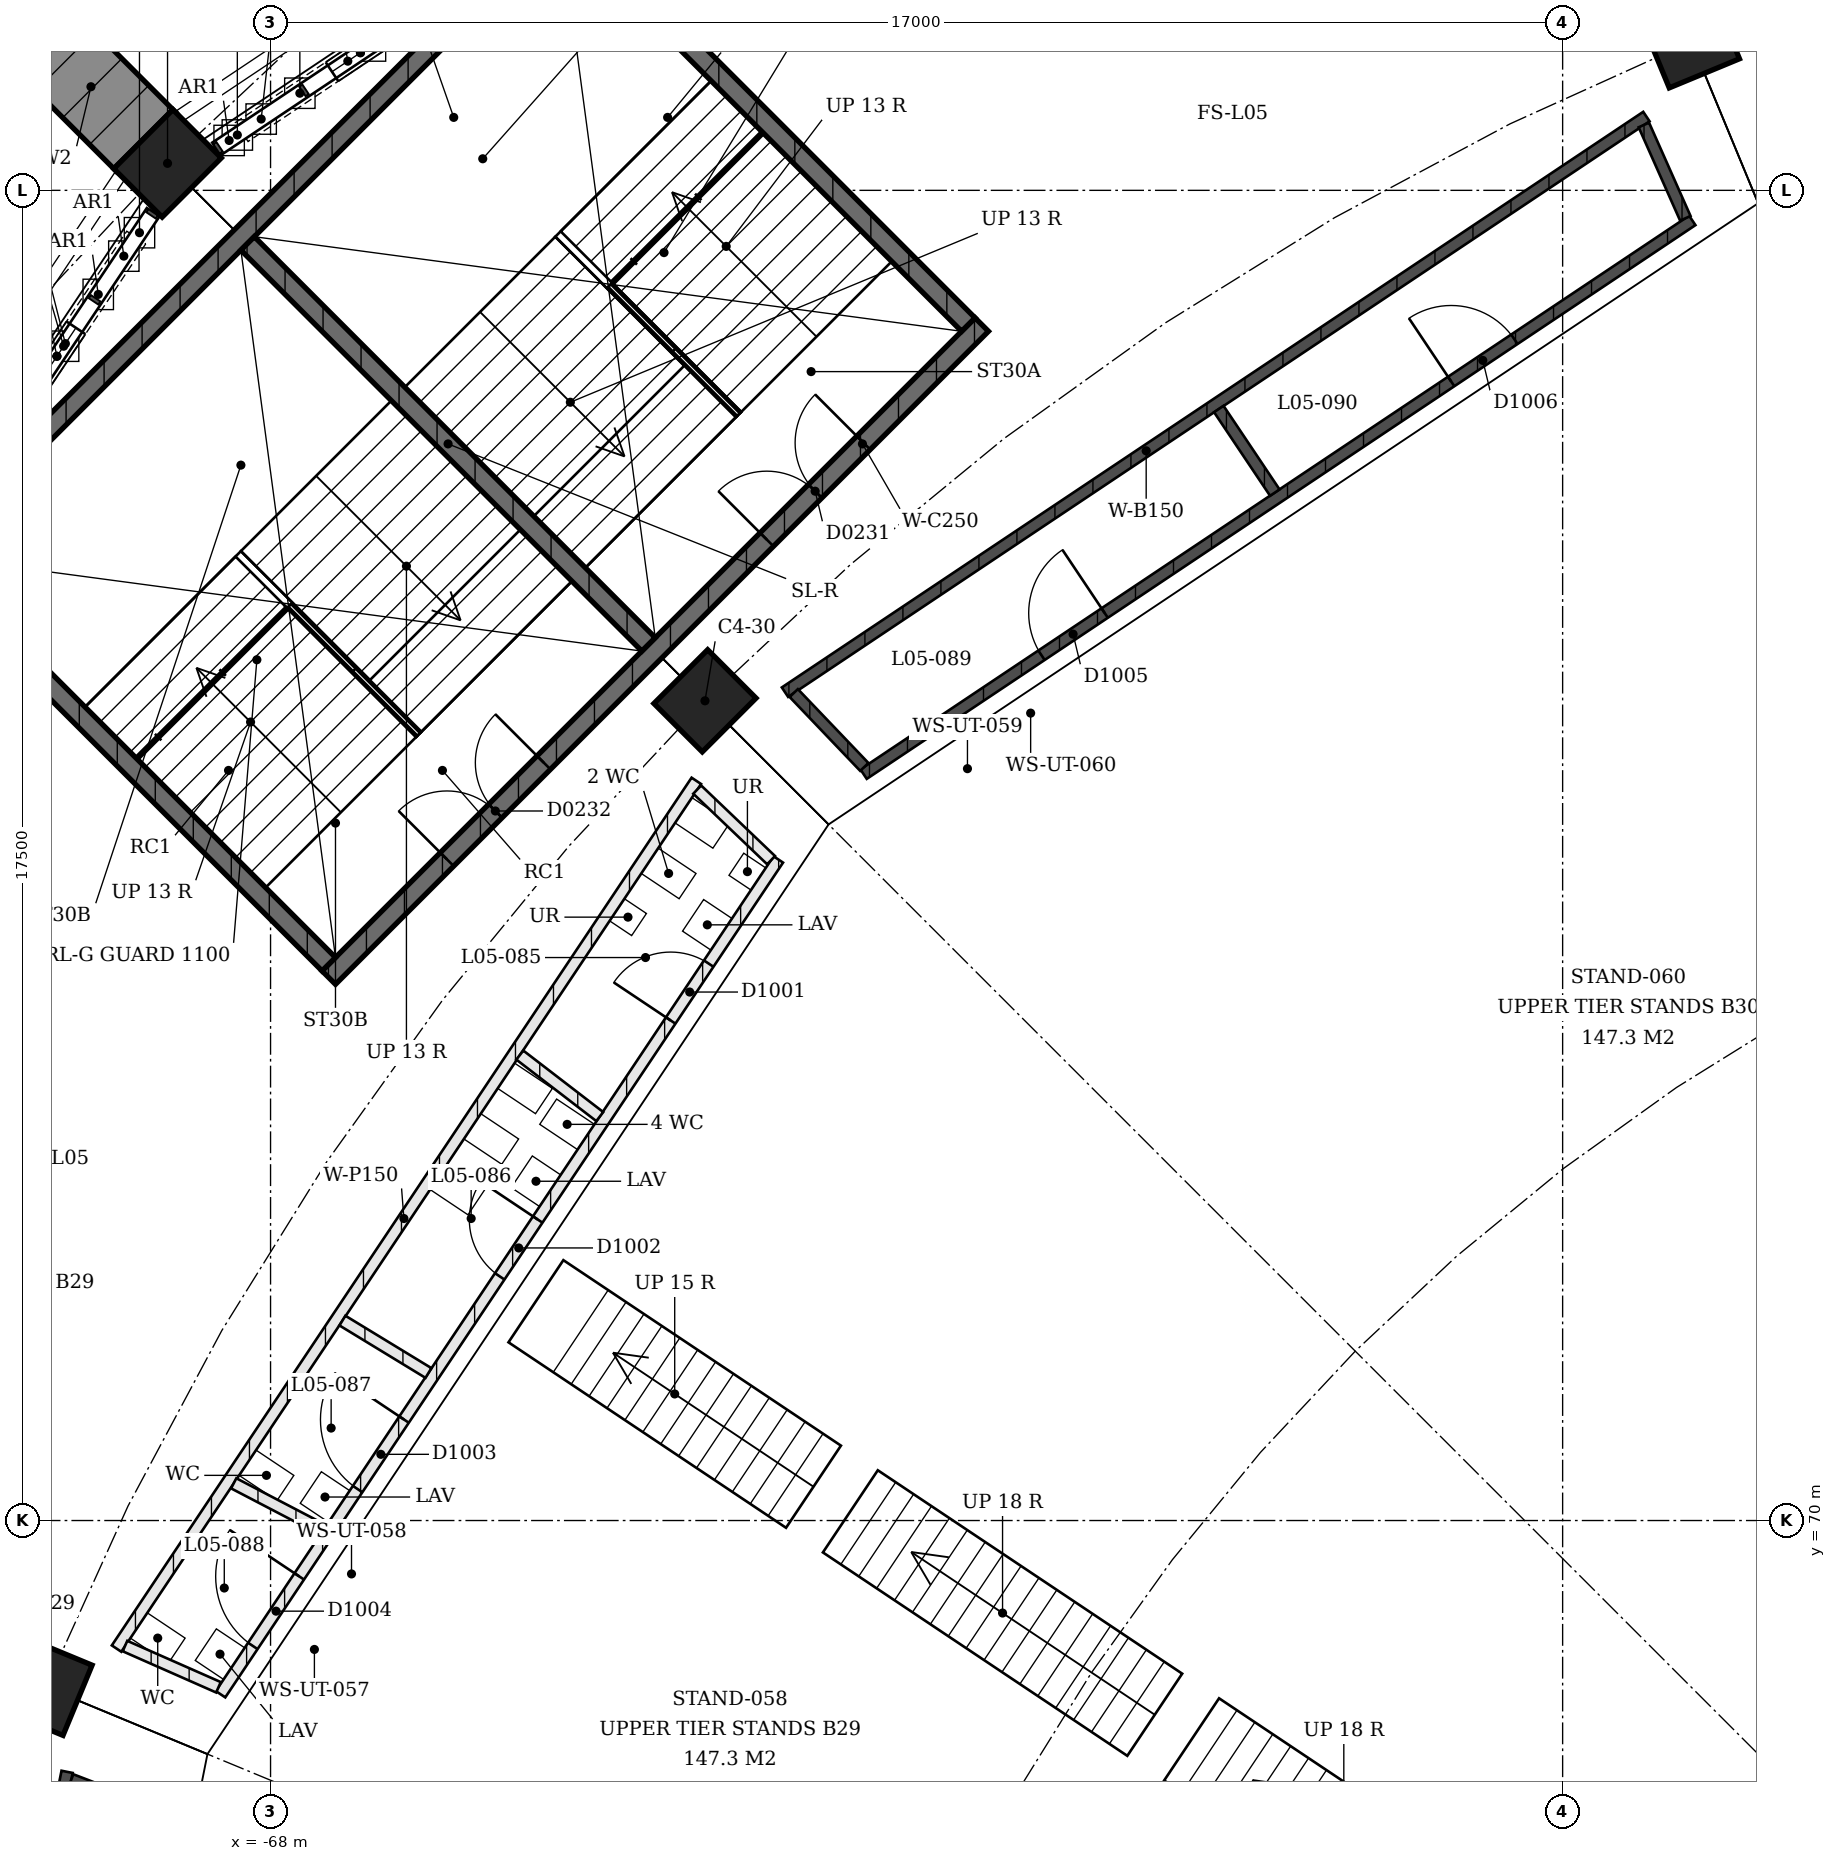
"""IFC4 building model, lengths in metres.
Left out: names, types, materials, properties, quantities, classifications, styles, units other than length and angle.
Written with IfcOpenShell. Run it as: python <this file> out.ifc"""

import sys

from ifc_helpers import new_model, si_unit, direction, frame, frame_2d, origin, origin_2d, place, context, subcontext, project, spatial, polyline, rectangle, outline, extrude, element, fill, save


model = new_model("IFC4")
c1 = context("Model", 3, precision=1e-05, world=origin(), true_north=direction((0.0, 1.0)))
c2 = subcontext(c1, "Body", "Model", "MODEL_VIEW")
j1 = project(units=[si_unit("LENGTHUNIT", "METRE"), si_unit("PLANEANGLEUNIT", "RADIAN")], contexts=[c1])
p1 = place(None, origin())
s1 = spatial("IfcSite", under=j1, at=p1, CompositionType="ELEMENT")
p2 = place(p1, origin())
s2 = spatial("IfcBuilding", under=s1, at=p2, CompositionType="ELEMENT")
p3 = place(p2, frame((0.0, 0.0, 22.5)))
s3 = spatial("IfcBuildingStorey", under=s2, at=p3, CompositionType="ELEMENT", Elevation=22.5)
for number, where, z_axis, x_axis in (
    (1, (-70.955, 67.807, 0.0), (0.0, 0.0, 1.0), (-0.383, -0.924, 0.0)),
    (2, (-62.284, 80.784, 0.0), (0.0, 0.0, 1.0), (-0.707, -0.707, 0.0)),
):
    element("IfcColumn", number, at=place(p3, frame(where, z_axis=z_axis, x_axis=x_axis)), inside=s3, PredefinedType="COLUMN", context=c2, shape_type="SweptSolid", body=[
        extrude(rectangle(XDim=1.0, YDim=0.9, at=origin_2d()), origin(), (0.0, 0.0, 1.0), 6.5),
    ])
p4 = place(p3, frame((-69.355, 87.855, 0.0), z_axis=(0.0, 0.0, 1.0), x_axis=(-0.707106781187, -0.707106781187, 0.0)))
e3 = element("IfcColumn", 3, at=p4, inside=s3, PredefinedType="COLUMN", context=c2, shape_type="SweptSolid", body=[
    extrude(rectangle(XDim=1.1, YDim=0.9, at=origin_2d()), origin(), (0.0, 0.0, 1.0), 6.5),
])
p5 = place(p3, frame((-49.307, 89.455, 0.0), z_axis=(0.0, 0.0, 1.0), x_axis=(-0.923879532511, -0.382683432365, 0.0)))
e4 = element("IfcColumn", 4, at=p5, inside=s3, PredefinedType="COLUMN", context=c2, shape_type="SweptSolid", body=[
    extrude(rectangle(XDim=1.0, YDim=0.9, at=origin_2d()), origin(), (0.0, 0.0, 1.0), 6.5),
])
p6 = place(p3, frame((-71.854, 83.755, 4.1), z_axis=(0.0, 0.0, 1.0), x_axis=(0.555554703021, 0.831479988906, 0.0)))
e5 = element("IfcWall", 5, at=p6, inside=s3, PredefinedType="SOLIDWALL", context=c2, shape_type="SweptSolid", body=[
    extrude(outline(polyline([(0.0, 0.0), (3.757, 0.0), (3.757, 0.05), (3.635, 1.311), (3.271, 2.577), (2.678, 3.754), (1.879, 4.8), (1.079, 3.754), (0.486, 2.577), (0.123, 1.311), (0.0, 0.05), (0.0, 0.0)])), frame((0.0, 0.15, 0.0), z_axis=(0.0, -1.0, 0.0), x_axis=(1.0, 0.0, 0.0)), (0.0, 0.0, 1.0), 0.3),
])
p7 = place(p6, frame((1.428, 0.0, 0.4)))
e6 = element("IfcOpeningElement", 6, at=p7, cuts=e5, PredefinedType="OPENING", context=c2, shape_type="SweptSolid", body=[
    extrude(rectangle(XDim=0.9, YDim=3.6, at=frame_2d((0.45, 1.8))), frame((0.0, 0.16, 0.0), z_axis=(0.0, -1.0, 0.0), x_axis=(1.0, 0.0, 0.0)), (0.0, 0.0, 1.0), 0.32),
])
p8 = place(p3, frame((-68.379, 88.267, 4.1), z_axis=(0.0, 0.0, 1.0), x_axis=(0.831479988906, 0.555554703021, 0.0)))
e7 = element("IfcWall", 7, at=p8, inside=s3, PredefinedType="SOLIDWALL", context=c2, shape_type="SweptSolid", body=[
    extrude(outline(polyline([(0.0, 0.0), (3.757, 0.0), (3.757, 0.05), (3.635, 1.311), (3.271, 2.577), (2.678, 3.754), (1.879, 4.8), (1.079, 3.754), (0.486, 2.577), (0.123, 1.311), (0.0, 0.05), (0.0, 0.0)])), frame((0.0, 0.15, 0.0), z_axis=(0.0, -1.0, 0.0), x_axis=(1.0, 0.0, 0.0)), (0.0, 0.0, 1.0), 0.3),
])
p9 = place(p8, frame((1.428, 0.0, 0.4)))
e8 = element("IfcOpeningElement", 8, at=p9, cuts=e7, PredefinedType="OPENING", context=c2, shape_type="SweptSolid", body=[
    extrude(rectangle(XDim=0.9, YDim=3.6, at=frame_2d((0.45, 1.8))), frame((0.0, 0.16, 0.0), z_axis=(0.0, -1.0, 0.0), x_axis=(1.0, 0.0, 0.0)), (0.0, 0.0, 1.0), 0.32),
])
p10 = place(p3, frame((-58.643, 85.734, 0.0), z_axis=(0.0, 0.0, 1.0), x_axis=(-0.707106781187, -0.707106781187, 0.0)))
e9 = element("IfcWall", 9, at=p10, inside=s3, PredefinedType="SHEAR", context=c2, shape_type="SweptSolid", body=[
    extrude(rectangle(XDim=12.15, YDim=0.25, at=frame_2d((6.075, 0.0))), origin(), (0.0, 0.0, 1.0), 2.1),
])
p11 = place(p10, frame((2.2, 0.0, 0.0)))
e10 = element("IfcOpeningElement", 10, at=p11, cuts=e9, PredefinedType="OPENING", context=c2, shape_type="SweptSolid", body=[
    extrude(rectangle(XDim=1.8, YDim=2.1, at=frame_2d((0.9, 1.05))), frame((0.0, 0.125, 0.0), z_axis=(0.0, -1.0, 0.0), x_axis=(1.0, 0.0, 0.0)), (0.0, 0.0, 1.0), 0.25),
])
p12 = place(p10, frame((8.15, 0.0, 0.0)))
e11 = element("IfcOpeningElement", 11, at=p12, cuts=e9, PredefinedType="OPENING", context=c2, shape_type="SweptSolid", body=[
    extrude(rectangle(XDim=1.8, YDim=2.1, at=frame_2d((0.9, 1.05))), frame((0.0, 0.125, 0.0), z_axis=(0.0, -1.0, 0.0), x_axis=(1.0, 0.0, 0.0)), (0.0, 0.0, 1.0), 0.25),
])
p13 = place(p3, frame((-64.094, 91.186, 0.0), z_axis=(0.0, 0.0, 1.0), x_axis=(-0.707106781187, -0.707106781187, 0.0)))
e12 = element("IfcWall", 12, at=p13, inside=s3, PredefinedType="SHEAR", context=c2, shape_type="SweptSolid", body=[
    extrude(rectangle(XDim=12.15, YDim=0.25, at=frame_2d((6.075, 0.0))), origin(), (0.0, 0.0, 1.0), 2.1),
])
for number, where, z_axis, x_axis in (
    (13, (-58.819, 85.734, 0.0), (0.0, 0.0, 1.0), (-0.707, 0.707, 0.0)),
    (14, (-67.234, 77.319, 0.0), (0.0, 0.0, 1.0), (-0.707, 0.707, 0.0)),
):
    element("IfcWall", number, at=place(p3, frame(where, z_axis=z_axis, x_axis=x_axis)), inside=s3, PredefinedType="SHEAR", context=c2, shape_type="SweptSolid", body=[
        extrude(rectangle(XDim=7.46, YDim=0.25, at=frame_2d((3.73, 0.0))), origin(), (0.0, 0.0, 1.0), 2.1),
    ])
p14 = place(p3, frame((-63.027, 81.527, 0.0), z_axis=(0.0, 0.0, 1.0), x_axis=(-0.707106781187, 0.707106781187, 0.0)))
e15 = element("IfcWall", 15, at=p14, inside=s3, PredefinedType="SHEAR", context=c2, shape_type="SweptSolid", body=[
    extrude(rectangle(XDim=7.46, YDim=0.25, at=frame_2d((3.73, 0.0))), origin(), (0.0, 0.0, 1.0), 2.1),
])
p15 = place(p3, frame((-73.336, 53.325, 0.0), z_axis=(0.0, 0.0, 1.0), x_axis=(0.195086146928, 0.980786110871, 0.0)))
e16 = element("IfcWall", 16, at=p15, inside=s3, PredefinedType="SOLIDWALL", context=c2, shape_type="SweptSolid", body=[
    extrude(rectangle(XDim=13.631, YDim=0.15, at=frame_2d((6.815, 0.0))), origin(), (0.0, 0.0, 1.0), 3.0),
])
p16 = place(p3, frame((-69.368, 66.109, 0.0), z_axis=(0.0, 0.0, 1.0), x_axis=(-0.933331557443, 0.359015603953, 0.0)))
e17 = element("IfcWall", 17, at=p16, inside=s3, PredefinedType="SOLIDWALL", context=c2, shape_type="SweptSolid", body=[
    extrude(rectangle(XDim=1.344, YDim=0.15, at=frame_2d((0.672, 0.0))), origin(), (0.0, 0.0, 1.0), 3.0),
])
p17 = place(p3, frame((-61.32, 78.697, 0.0), z_axis=(0.0, 0.0, 1.0), x_axis=(-0.555570028225, -0.831469749142, 0.0)))
e18 = element("IfcWall", 18, at=p17, inside=s3, PredefinedType="PARTITIONING", context=c2, shape_type="SweptSolid", body=[
    extrude(rectangle(XDim=13.209, YDim=0.15, at=frame_2d((6.604, 0.0))), origin(), (0.0, 0.0, 1.0), 3.0),
])
p18 = place(p17, frame((1.648, 0.0, 0.0)))
e19 = element("IfcOpeningElement", 19, at=p18, cuts=e18, PredefinedType="OPENING", context=c2, shape_type="SweptSolid", body=[
    extrude(rectangle(XDim=0.9, YDim=2.1, at=frame_2d((0.45, 1.05))), frame((0.0, 0.075, 0.0), z_axis=(0.0, -1.0, 0.0), x_axis=(1.0, 0.0, 0.0)), (0.0, 0.0, 1.0), 0.15),
])
p19 = place(p17, frame((5.697, 0.0, 0.0)))
e20 = element("IfcOpeningElement", 20, at=p19, cuts=e18, PredefinedType="OPENING", context=c2, shape_type="SweptSolid", body=[
    extrude(rectangle(XDim=0.9, YDim=2.1, at=frame_2d((0.45, 1.05))), frame((0.0, 0.075, 0.0), z_axis=(0.0, -1.0, 0.0), x_axis=(1.0, 0.0, 0.0)), (0.0, 0.0, 1.0), 0.15),
])
p20 = place(p17, frame((8.863, 0.0, 0.0)))
e21 = element("IfcOpeningElement", 21, at=p20, cuts=e18, PredefinedType="OPENING", context=c2, shape_type="SweptSolid", body=[
    extrude(rectangle(XDim=1.1, YDim=2.1, at=frame_2d((0.55, 1.05))), frame((0.0, 0.075, 0.0), z_axis=(0.0, -1.0, 0.0), x_axis=(1.0, 0.0, 0.0)), (0.0, 0.0, 1.0), 0.15),
])
p21 = place(p17, frame((11.344, 0.0, 0.0)))
e22 = element("IfcOpeningElement", 22, at=p21, cuts=e18, PredefinedType="OPENING", context=c2, shape_type="SweptSolid", body=[
    extrude(rectangle(XDim=1.1, YDim=2.1, at=frame_2d((0.55, 1.05))), frame((0.0, 0.075, 0.0), z_axis=(0.0, -1.0, 0.0), x_axis=(1.0, 0.0, 0.0)), (0.0, 0.0, 1.0), 0.15),
])
p22 = place(p3, frame((-62.398, 79.731, 0.0), z_axis=(0.0, 0.0, 1.0), x_axis=(-0.555573905052, -0.831467158717, 0.0)))
e23 = element("IfcWall", 23, at=p22, inside=s3, PredefinedType="PARTITIONING", context=c2, shape_type="SweptSolid", body=[
    extrude(rectangle(XDim=13.73, YDim=0.15, at=frame_2d((6.865, 0.0))), origin(), (0.0, 0.0, 1.0), 3.0),
])
p23 = place(p3, frame((-61.414, 78.688, 0.0), z_axis=(0.0, 0.0, 1.0), x_axis=(-0.723174104738, 0.690665776072, 0.0)))
e24 = element("IfcWall", 24, at=p23, inside=s3, PredefinedType="PARTITIONING", context=c2, shape_type="SweptSolid", body=[
    extrude(rectangle(XDim=1.344, YDim=0.15, at=frame_2d((0.672, 0.0))), origin(), (0.0, 0.0, 1.0), 3.0),
])
p24 = place(p3, frame((-63.668, 75.314, 0.0), z_axis=(0.0, 0.0, 1.0), x_axis=(-0.792767594219, 0.609524028695, 0.0)))
e25 = element("IfcWall", 25, at=p24, inside=s3, PredefinedType="PARTITIONING", context=c2, shape_type="SweptSolid", body=[
    extrude(rectangle(XDim=1.327, YDim=0.15, at=frame_2d((0.664, 0.0))), origin(), (0.0, 0.0, 1.0), 3.0),
])
p25 = place(p3, frame((-65.922, 71.941, 0.0), z_axis=(0.0, 0.0, 1.0), x_axis=(-0.854109602484, 0.520093056043, 0.0)))
e26 = element("IfcWall", 26, at=p25, inside=s3, PredefinedType="PARTITIONING", context=c2, shape_type="SweptSolid", body=[
    extrude(rectangle(XDim=1.325, YDim=0.15, at=frame_2d((0.663, 0.0))), origin(), (0.0, 0.0, 1.0), 3.0),
])
p26 = place(p3, frame((-67.304, 69.874, 0.0), z_axis=(0.0, 0.0, 1.0), x_axis=(-0.886633867097, 0.462472037768, 0.0)))
e27 = element("IfcWall", 27, at=p26, inside=s3, PredefinedType="PARTITIONING", context=c2, shape_type="SweptSolid", body=[
    extrude(rectangle(XDim=1.332, YDim=0.15, at=frame_2d((0.666, 0.0))), origin(), (0.0, 0.0, 1.0), 3.0),
])
p27 = place(p3, frame((-68.685, 67.806, 0.0), z_axis=(0.0, 0.0, 1.0), x_axis=(-0.914894130368, 0.403693857048, 0.0)))
e28 = element("IfcWall", 28, at=p27, inside=s3, PredefinedType="PARTITIONING", context=c2, shape_type="SweptSolid", body=[
    extrude(rectangle(XDim=1.344, YDim=0.15, at=frame_2d((0.672, 0.0))), origin(), (0.0, 0.0, 1.0), 3.0),
])
p28 = place(p3, frame((-60.197, 79.82, 0.0), z_axis=(0.0, 0.0, 1.0), x_axis=(0.831471244595, 0.555567790114, 0.0)))
e29 = element("IfcWall", 29, at=p28, inside=s3, PredefinedType="SOLIDWALL", context=c2, shape_type="SweptSolid", body=[
    extrude(rectangle(XDim=13.113, YDim=0.15, at=frame_2d((6.557, 0.0))), origin(), (0.0, 0.0, 1.0), 3.0),
])
p29 = place(p28, frame((2.815, 0.0, 0.0)))
e30 = element("IfcOpeningElement", 30, at=p29, cuts=e29, PredefinedType="OPENING", context=c2, shape_type="SweptSolid", body=[
    extrude(rectangle(XDim=1.0, YDim=2.1, at=frame_2d((0.5, 1.05))), frame((0.0, 0.075, 0.0), z_axis=(0.0, -1.0, 0.0), x_axis=(1.0, 0.0, 0.0)), (0.0, 0.0, 1.0), 0.15),
])
p30 = place(p28, frame((9.298, 0.0, 0.0)))
e31 = element("IfcOpeningElement", 31, at=p30, cuts=e29, PredefinedType="OPENING", context=c2, shape_type="SweptSolid", body=[
    extrude(rectangle(XDim=1.0, YDim=2.1, at=frame_2d((0.5, 1.05))), frame((0.0, 0.075, 0.0), z_axis=(0.0, -1.0, 0.0), x_axis=(1.0, 0.0, 0.0)), (0.0, 0.0, 1.0), 0.15),
])
p31 = place(p3, frame((-61.231, 80.898, 0.0), z_axis=(0.0, 0.0, 1.0), x_axis=(0.831471173823, 0.555567896033, 0.0)))
e32 = element("IfcWall", 32, at=p31, inside=s3, PredefinedType="SOLIDWALL", context=c2, shape_type="SweptSolid", body=[
    extrude(rectangle(XDim=13.631, YDim=0.15, at=frame_2d((6.815, 0.0))), origin(), (0.0, 0.0, 1.0), 3.0),
])
p32 = place(p3, frame((-60.188, 79.914, 0.0), z_axis=(0.0, 0.0, 1.0), x_axis=(-0.690665776072, 0.723174104738, 0.0)))
e33 = element("IfcWall", 33, at=p32, inside=s3, PredefinedType="SOLIDWALL", context=c2, shape_type="SweptSolid", body=[
    extrude(rectangle(XDim=1.344, YDim=0.15, at=frame_2d((0.672, 0.0))), origin(), (0.0, 0.0, 1.0), 3.0),
])
p33 = place(p3, frame((-54.787, 83.523, 0.0), z_axis=(0.0, 0.0, 1.0), x_axis=(-0.556613340271, 0.830771683095, 0.0)))
e34 = element("IfcWall", 34, at=p33, inside=s3, PredefinedType="SOLIDWALL", context=c2, shape_type="SweptSolid", body=[
    extrude(rectangle(XDim=1.324, YDim=0.15, at=frame_2d((0.662, 0.0))), origin(), (0.0, 0.0, 1.0), 3.0),
])
p34 = place(p3, frame((-49.386, 87.132, 0.0), z_axis=(0.0, 0.0, 1.0), x_axis=(-0.405902438759, 0.913916413142, 0.0)))
e35 = element("IfcWall", 35, at=p34, inside=s3, PredefinedType="SOLIDWALL", context=c2, shape_type="SweptSolid", body=[
    extrude(rectangle(XDim=1.344, YDim=0.15, at=frame_2d((0.672, 0.0))), origin(), (0.0, 0.0, 1.0), 3.0),
])
p35 = place(p7, origin())
e36 = element("IfcWindow", 36, at=p35, inside=s3, PartitioningType="SINGLE_PANEL", PredefinedType="WINDOW", context=c2, shape_type="SweptSolid", body=[
    extrude(rectangle(XDim=0.9, YDim=3.6, at=frame_2d((0.45, 1.8))), frame((0.0, 0.03, 0.0), z_axis=(0.0, -1.0, 0.0), x_axis=(1.0, 0.0, 0.0)), (0.0, 0.0, 1.0), 0.06),
])
fill(e6, e36)
p36 = place(p9, origin())
e37 = element("IfcWindow", 37, at=p36, inside=s3, PartitioningType="SINGLE_PANEL", PredefinedType="WINDOW", context=c2, shape_type="SweptSolid", body=[
    extrude(rectangle(XDim=0.9, YDim=3.6, at=frame_2d((0.45, 1.8))), frame((0.0, 0.03, 0.0), z_axis=(0.0, -1.0, 0.0), x_axis=(1.0, 0.0, 0.0)), (0.0, 0.0, 1.0), 0.06),
])
fill(e8, e37)
p37 = place(p11, origin())
e38 = element("IfcDoor", 38, at=p37, inside=s3, OperationType="DOUBLE_DOOR_SINGLE_SWING", PredefinedType="DOOR", context=c2, shape_type="SweptSolid", body=[
    extrude(rectangle(XDim=1.8, YDim=2.1, at=frame_2d((0.9, 1.05))), frame((0.0, 0.025, 0.0), z_axis=(0.0, -1.0, 0.0), x_axis=(1.0, 0.0, 0.0)), (0.0, 0.0, 1.0), 0.05),
])
fill(e10, e38)
p38 = place(p12, origin())
e39 = element("IfcDoor", 39, at=p38, inside=s3, OperationType="DOUBLE_DOOR_SINGLE_SWING", PredefinedType="DOOR", context=c2, shape_type="SweptSolid", body=[
    extrude(rectangle(XDim=1.8, YDim=2.1, at=frame_2d((0.9, 1.05))), frame((0.0, 0.025, 0.0), z_axis=(0.0, -1.0, 0.0), x_axis=(1.0, 0.0, 0.0)), (0.0, 0.0, 1.0), 0.05),
])
fill(e11, e39)
p39 = place(p18, origin())
e40 = element("IfcDoor", 40, at=p39, inside=s3, OperationType="SINGLE_SWING_RIGHT", PredefinedType="DOOR", context=c2, shape_type="SweptSolid", body=[
    extrude(rectangle(XDim=0.9, YDim=2.1, at=frame_2d((0.45, 1.05))), frame((0.0, 0.025, 0.0), z_axis=(0.0, -1.0, 0.0), x_axis=(1.0, 0.0, 0.0)), (0.0, 0.0, 1.0), 0.05),
])
fill(e19, e40)
p40 = place(p19, origin())
e41 = element("IfcDoor", 41, at=p40, inside=s3, OperationType="SINGLE_SWING_LEFT", PredefinedType="DOOR", context=c2, shape_type="SweptSolid", body=[
    extrude(rectangle(XDim=0.9, YDim=2.1, at=frame_2d((0.45, 1.05))), frame((0.0, 0.025, 0.0), z_axis=(0.0, -1.0, 0.0), x_axis=(1.0, 0.0, 0.0)), (0.0, 0.0, 1.0), 0.05),
])
fill(e20, e41)
p41 = place(p20, origin())
e42 = element("IfcDoor", 42, at=p41, inside=s3, OperationType="SINGLE_SWING_LEFT", PredefinedType="DOOR", context=c2, shape_type="SweptSolid", body=[
    extrude(rectangle(XDim=1.1, YDim=2.1, at=frame_2d((0.55, 1.05))), frame((0.0, 0.025, 0.0), z_axis=(0.0, -1.0, 0.0), x_axis=(1.0, 0.0, 0.0)), (0.0, 0.0, 1.0), 0.05),
])
fill(e21, e42)
p42 = place(p21, origin())
e43 = element("IfcDoor", 43, at=p42, inside=s3, OperationType="SINGLE_SWING_LEFT", PredefinedType="DOOR", context=c2, shape_type="SweptSolid", body=[
    extrude(rectangle(XDim=1.1, YDim=2.1, at=frame_2d((0.55, 1.05))), frame((0.0, 0.025, 0.0), z_axis=(0.0, -1.0, 0.0), x_axis=(1.0, 0.0, 0.0)), (0.0, 0.0, 1.0), 0.05),
])
fill(e22, e43)
p43 = place(p29, origin())
e44 = element("IfcDoor", 44, at=p43, inside=s3, OperationType="SINGLE_SWING_LEFT", PredefinedType="DOOR", context=c2, shape_type="SweptSolid", body=[
    extrude(rectangle(XDim=1.0, YDim=2.1, at=frame_2d((0.5, 1.05))), frame((0.0, 0.025, 0.0), z_axis=(0.0, -1.0, 0.0), x_axis=(1.0, 0.0, 0.0)), (0.0, 0.0, 1.0), 0.05),
])
fill(e30, e44)
p44 = place(p30, origin())
e45 = element("IfcDoor", 45, at=p44, inside=s3, OperationType="SINGLE_SWING_RIGHT", PredefinedType="DOOR", context=c2, shape_type="SweptSolid", body=[
    extrude(rectangle(XDim=1.0, YDim=2.1, at=frame_2d((0.5, 1.05))), frame((0.0, 0.025, 0.0), z_axis=(0.0, -1.0, 0.0), x_axis=(1.0, 0.0, 0.0)), (0.0, 0.0, 1.0), 0.05),
])
fill(e31, e45)
save(model, sys.argv[1])
